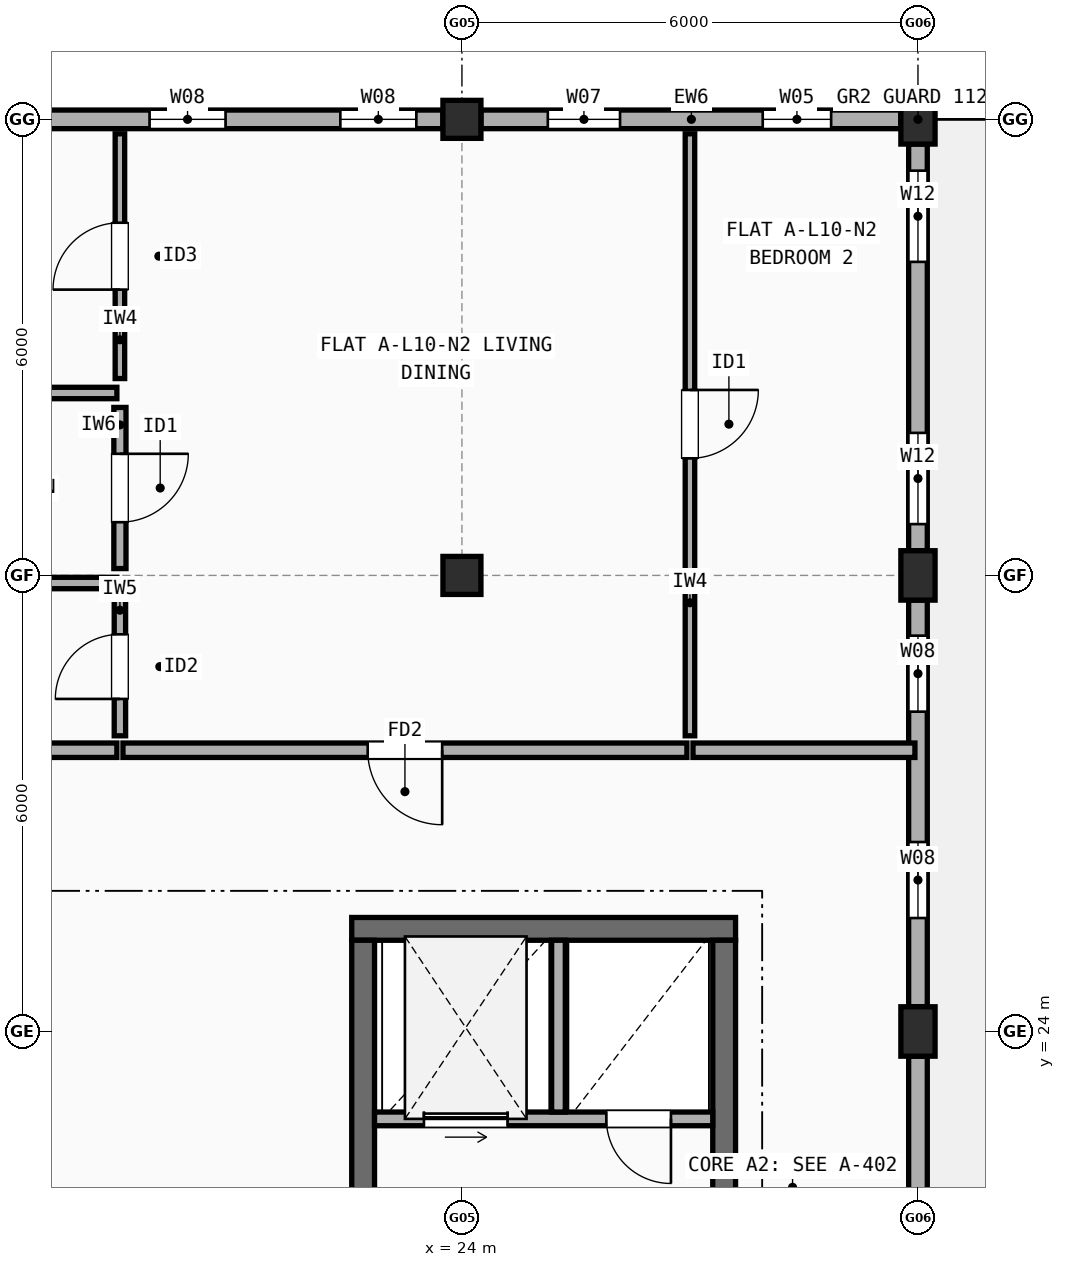
"""IFC4 building model, lengths in metres.
Left out: names, types, materials, properties, quantities, classifications, styles, units other than length and angle.
Written with IfcOpenShell. Run it as: python <this file> out.ifc"""

import sys

from ifc_helpers import new_model, si_unit, direction, frame, frame_2d, origin, origin_2d, place, context, subcontext, project, spatial, rectangle, extrude, element, fill, save


model = new_model("IFC4")
c1 = context("Model", 3, precision=1e-05, world=origin(), true_north=direction((0.0, 1.0)))
c2 = subcontext(c1, "Body", "Model", "MODEL_VIEW")
j1 = project(units=[si_unit("LENGTHUNIT", "METRE"), si_unit("PLANEANGLEUNIT", "RADIAN")], contexts=[c1])
p1 = place(None, origin())
s1 = spatial("IfcSite", under=j1, at=p1, CompositionType="ELEMENT")
p2 = place(p1, origin())
s2 = spatial("IfcBuilding", under=s1, at=p2, CompositionType="ELEMENT")
p3 = place(p2, frame((0.0, 0.0, 33.3)))
s3 = spatial("IfcBuildingStorey", under=s2, at=p3, CompositionType="ELEMENT", Elevation=33.3)
for number, where, z_axis, x_axis in (
    (1, (24.0, 30.0, 0.0), (0.0, 0.0, 1.0), (1.0, 0.0, 0.0)),
    (2, (24.0, 36.0, 0.0), (0.0, 0.0, 1.0), (1.0, 0.0, 0.0)),
):
    element("IfcColumn", number, at=place(p3, frame(where, z_axis=z_axis, x_axis=x_axis)), inside=s3, PredefinedType="COLUMN", context=c2, shape_type="SweptSolid", body=[
        extrude(rectangle(XDim=0.5, YDim=0.5, at=origin_2d()), origin(), (0.0, 0.0, 1.0), 2.99),
    ])
for number, where, z_axis, x_axis in (
    (3, (30.0, 24.0, 0.0), (0.0, 0.0, 1.0), (1.0, 0.0, 0.0)),
    (4, (30.0, 30.0, 0.0), (0.0, 0.0, 1.0), (1.0, 0.0, 0.0)),
    (5, (30.0, 36.0, 0.0), (0.0, 0.0, 1.0), (1.0, 0.0, 0.0)),
):
    element("IfcColumn", number, at=place(p3, frame(where, z_axis=z_axis, x_axis=x_axis)), inside=s3, PredefinedType="COLUMN", context=c2, shape_type="SweptSolid", body=[
        extrude(rectangle(XDim=0.45, YDim=0.65, at=origin_2d()), origin(), (0.0, 0.0, 1.0), 2.99),
    ])
p4 = place(p3, frame((30.0, 18.325, 0.0), z_axis=(0.0, 0.0, 1.0), x_axis=(0.0, 1.0, 0.0)))
e6 = element("IfcWall", 6, at=p4, inside=s3, PredefinedType="STANDARD", context=c2, shape_type="SweptSolid", body=[
    extrude(rectangle(XDim=5.35, YDim=0.245, at=frame_2d((2.675, 0.0))), origin(), (0.0, 0.0, 1.0), 2.472),
])
p5 = place(p4, frame((1.925, 0.0, 0.0)))
e7 = element("IfcOpeningElement", 7, at=p5, cuts=e6, PredefinedType="OPENING", context=c2, shape_type="SweptSolid", body=[
    extrude(rectangle(XDim=1.5, YDim=2.15, at=frame_2d((0.75, 1.075))), frame((0.0, 0.133, 0.0), z_axis=(0.0, -1.0, 0.0), x_axis=(1.0, 0.0, 0.0)), (0.0, 0.0, 1.0), 0.265),
])
p6 = place(p3, frame((30.0, 24.325, 0.0), z_axis=(0.0, 0.0, 1.0), x_axis=(0.0, 1.0, 0.0)))
e8 = element("IfcWall", 8, at=p6, inside=s3, PredefinedType="STANDARD", context=c2, shape_type="SweptSolid", body=[
    extrude(rectangle(XDim=5.35, YDim=0.245, at=frame_2d((2.675, 0.0))), origin(), (0.0, 0.0, 1.0), 2.472),
])
p7 = place(p6, frame((1.167, 0.0, 0.9)))
e9 = element("IfcOpeningElement", 9, at=p7, cuts=e8, PredefinedType="OPENING", context=c2, shape_type="SweptSolid", body=[
    extrude(rectangle(XDim=1.0, YDim=1.4, at=frame_2d((0.5, 0.7))), frame((0.0, 0.133, 0.0), z_axis=(0.0, -1.0, 0.0), x_axis=(1.0, 0.0, 0.0)), (0.0, 0.0, 1.0), 0.265),
])
p8 = place(p6, frame((3.883, 0.0, 0.9)))
e10 = element("IfcOpeningElement", 10, at=p8, cuts=e8, PredefinedType="OPENING", context=c2, shape_type="SweptSolid", body=[
    extrude(rectangle(XDim=1.0, YDim=1.4, at=frame_2d((0.5, 0.7))), frame((0.0, 0.133, 0.0), z_axis=(0.0, -1.0, 0.0), x_axis=(1.0, 0.0, 0.0)), (0.0, 0.0, 1.0), 0.265),
])
p9 = place(p3, frame((30.0, 30.325, 0.0), z_axis=(0.0, 0.0, 1.0), x_axis=(0.0, 1.0, 0.0)))
e11 = element("IfcWall", 11, at=p9, inside=s3, PredefinedType="STANDARD", context=c2, shape_type="SweptSolid", body=[
    extrude(rectangle(XDim=5.35, YDim=0.245, at=frame_2d((2.675, 0.0))), origin(), (0.0, 0.0, 1.0), 2.472),
])
p10 = place(p9, frame((0.35, 0.0, 0.9)))
e12 = element("IfcOpeningElement", 12, at=p10, cuts=e11, PredefinedType="OPENING", context=c2, shape_type="SweptSolid", body=[
    extrude(rectangle(XDim=1.2, YDim=1.35, at=frame_2d((0.6, 0.675))), frame((0.0, 0.133, 0.0), z_axis=(0.0, -1.0, 0.0), x_axis=(1.0, 0.0, 0.0)), (0.0, 0.0, 1.0), 0.265),
])
p11 = place(p9, frame((3.8, 0.0, 0.9)))
e13 = element("IfcOpeningElement", 13, at=p11, cuts=e11, PredefinedType="OPENING", context=c2, shape_type="SweptSolid", body=[
    extrude(rectangle(XDim=1.2, YDim=1.35, at=frame_2d((0.6, 0.675))), frame((0.0, 0.133, 0.0), z_axis=(0.0, -1.0, 0.0), x_axis=(1.0, 0.0, 0.0)), (0.0, 0.0, 1.0), 0.265),
])
p12 = place(p3, frame((29.775, 36.0, 0.0), z_axis=(0.0, 0.0, 1.0), x_axis=(-1.0, 0.0, 0.0)))
e14 = element("IfcWall", 14, at=p12, inside=s3, PredefinedType="STANDARD", context=c2, shape_type="SweptSolid", body=[
    extrude(rectangle(XDim=5.525, YDim=0.245, at=frame_2d((2.762, 0.0))), origin(), (0.0, 0.0, 1.0), 2.472),
])
p13 = place(p12, frame((0.917, 0.0, 0.9)))
e15 = element("IfcOpeningElement", 15, at=p13, cuts=e14, PredefinedType="OPENING", context=c2, shape_type="SweptSolid", body=[
    extrude(rectangle(XDim=0.9, YDim=1.4, at=frame_2d((0.45, 0.7))), frame((0.0, 0.133, 0.0), z_axis=(0.0, -1.0, 0.0), x_axis=(1.0, 0.0, 0.0)), (0.0, 0.0, 1.0), 0.265),
])
p14 = place(p12, frame((3.695, 0.0, 0.9)))
e16 = element("IfcOpeningElement", 16, at=p14, cuts=e14, PredefinedType="OPENING", context=c2, shape_type="SweptSolid", body=[
    extrude(rectangle(XDim=0.95, YDim=1.35, at=frame_2d((0.475, 0.675))), frame((0.0, 0.133, 0.0), z_axis=(0.0, -1.0, 0.0), x_axis=(1.0, 0.0, 0.0)), (0.0, 0.0, 1.0), 0.265),
])
p15 = place(p3, frame((23.75, 36.0, 0.0), z_axis=(0.0, 0.0, 1.0), x_axis=(-1.0, 0.0, 0.0)))
e17 = element("IfcWall", 17, at=p15, inside=s3, PredefinedType="STANDARD", context=c2, shape_type="SweptSolid", body=[
    extrude(rectangle(XDim=5.5, YDim=0.245, at=frame_2d((2.75, 0.0))), origin(), (0.0, 0.0, 1.0), 2.472),
])
p16 = place(p15, frame((0.35, 0.0, 0.9)))
e18 = element("IfcOpeningElement", 18, at=p16, cuts=e17, PredefinedType="OPENING", context=c2, shape_type="SweptSolid", body=[
    extrude(rectangle(XDim=1.0, YDim=1.4, at=frame_2d((0.5, 0.7))), frame((0.0, 0.133, 0.0), z_axis=(0.0, -1.0, 0.0), x_axis=(1.0, 0.0, 0.0)), (0.0, 0.0, 1.0), 0.265),
])
p17 = place(p15, frame((2.86, 0.0, 0.9)))
e19 = element("IfcOpeningElement", 19, at=p17, cuts=e17, PredefinedType="OPENING", context=c2, shape_type="SweptSolid", body=[
    extrude(rectangle(XDim=1.0, YDim=1.4, at=frame_2d((0.5, 0.7))), frame((0.0, 0.133, 0.0), z_axis=(0.0, -1.0, 0.0), x_axis=(1.0, 0.0, 0.0)), (0.0, 0.0, 1.0), 0.265),
])
p18 = place(p3, frame((27.6, 25.35, 0.0), z_axis=(0.0, 0.0, 1.0), x_axis=(-1.0, 0.0, 0.0)))
e20 = element("IfcWall", 20, at=p18, inside=s3, PredefinedType="SHEAR", context=c2, shape_type="SweptSolid", body=[
    extrude(rectangle(XDim=5.05, YDim=0.3, at=frame_2d((2.525, 0.0))), origin(), (0.0, 0.0, 1.0), 2.99),
])
p19 = place(p3, frame((27.45, 18.75, 0.0), z_axis=(0.0, 0.0, 1.0), x_axis=(0.0, 1.0, 0.0)))
e21 = element("IfcWall", 21, at=p19, inside=s3, PredefinedType="SHEAR", context=c2, shape_type="SweptSolid", body=[
    extrude(rectangle(XDim=6.45, YDim=0.3, at=frame_2d((3.225, 0.0))), origin(), (0.0, 0.0, 1.0), 2.99),
])
p20 = place(p3, frame((22.7, 21.75, 0.0), z_axis=(0.0, 0.0, 1.0), x_axis=(0.0, 1.0, 0.0)))
e22 = element("IfcWall", 22, at=p20, inside=s3, PredefinedType="SHEAR", context=c2, shape_type="SweptSolid", body=[
    extrude(rectangle(XDim=3.45, YDim=0.3, at=frame_2d((1.725, 0.0))), origin(), (0.0, 0.0, 1.0), 2.99),
])
p21 = place(p3, frame((22.85, 22.85, 0.0), z_axis=(0.0, 0.0, 1.0), x_axis=(1.0, 0.0, 0.0)))
e23 = element("IfcWall", 23, at=p21, inside=s3, PredefinedType="SOLIDWALL", context=c2, shape_type="SweptSolid", body=[
    extrude(rectangle(XDim=4.45, YDim=0.18, at=frame_2d((2.225, 0.0))), origin(), (0.0, 0.0, 1.0), 2.99),
])
p22 = place(p21, frame((0.65, 0.0, 0.0)))
e24 = element("IfcOpeningElement", 24, at=p22, cuts=e23, PredefinedType="OPENING", context=c2, shape_type="SweptSolid", body=[
    extrude(rectangle(XDim=1.1, YDim=2.15, at=frame_2d((0.55, 1.075))), frame((0.0, 0.1, 0.0), z_axis=(0.0, -1.0, 0.0), x_axis=(1.0, 0.0, 0.0)), (0.0, 0.0, 1.0), 0.2),
])
p23 = place(p21, frame((3.05, 0.0, 0.0)))
e25 = element("IfcOpeningElement", 25, at=p23, cuts=e23, PredefinedType="OPENING", context=c2, shape_type="SweptSolid", body=[
    extrude(rectangle(XDim=0.85, YDim=2.1, at=frame_2d((0.425, 1.05))), frame((0.0, 0.1, 0.0), z_axis=(0.0, -1.0, 0.0), x_axis=(1.0, 0.0, 0.0)), (0.0, 0.0, 1.0), 0.2),
])
p24 = place(p3, frame((25.27, 22.94, 0.0), z_axis=(0.0, 0.0, 1.0), x_axis=(0.0, 1.0, 0.0)))
e26 = element("IfcWall", 26, at=p24, inside=s3, PredefinedType="SOLIDWALL", context=c2, shape_type="SweptSolid", body=[
    extrude(rectangle(XDim=2.26, YDim=0.18, at=frame_2d((1.13, 0.0))), origin(), (0.0, 0.0, 1.0), 2.99),
])
p25 = place(p3, frame((15.04, 27.7, 0.0), z_axis=(0.0, 0.0, 1.0), x_axis=(1.0, 0.0, 0.0)))
e27 = element("IfcWall", 27, at=p25, inside=s3, PredefinedType="SOLIDWALL", context=c2, shape_type="SweptSolid", body=[
    extrude(rectangle(XDim=4.42, YDim=0.19, at=frame_2d((2.21, 0.0))), origin(), (0.0, 0.0, 1.0), 2.99),
])
p26 = place(p3, frame((19.54, 27.7, 0.0), z_axis=(0.0, 0.0, 1.0), x_axis=(1.0, 0.0, 0.0)))
e28 = element("IfcWall", 28, at=p26, inside=s3, PredefinedType="SOLIDWALL", context=c2, shape_type="SweptSolid", body=[
    extrude(rectangle(XDim=7.42, YDim=0.19, at=frame_2d((3.71, 0.0))), origin(), (0.0, 0.0, 1.0), 2.99),
])
p27 = place(p26, frame((3.22, 0.0, 0.0)))
e29 = element("IfcOpeningElement", 29, at=p27, cuts=e28, PredefinedType="OPENING", context=c2, shape_type="SweptSolid", body=[
    extrude(rectangle(XDim=0.98, YDim=2.15, at=frame_2d((0.49, 1.075))), frame((0.0, 0.105, 0.0), z_axis=(0.0, -1.0, 0.0), x_axis=(1.0, 0.0, 0.0)), (0.0, 0.0, 1.0), 0.21),
])
p28 = place(p3, frame((19.5, 32.59, 0.0), z_axis=(0.0, 0.0, 1.0), x_axis=(0.0, 1.0, 0.0)))
e30 = element("IfcWall", 30, at=p28, inside=s3, PredefinedType="PARTITIONING", context=c2, shape_type="SweptSolid", body=[
    extrude(rectangle(XDim=3.22, YDim=0.125, at=frame_2d((1.61, 0.0))), origin(), (0.0, 0.0, 1.0), 2.99),
])
p29 = place(p28, frame((1.17, 0.0, 0.0)))
e31 = element("IfcOpeningElement", 31, at=p29, cuts=e30, PredefinedType="OPENING", context=c2, shape_type="SweptSolid", body=[
    extrude(rectangle(XDim=0.88, YDim=2.1, at=frame_2d((0.44, 1.05))), frame((0.0, 0.073, 0.0), z_axis=(0.0, -1.0, 0.0), x_axis=(1.0, 0.0, 0.0)), (0.0, 0.0, 1.0), 0.145),
])
p30 = place(p3, frame((19.5, 30.09, 0.0), z_axis=(0.0, 0.0, 1.0), x_axis=(0.0, 1.0, 0.0)))
e32 = element("IfcWall", 32, at=p30, inside=s3, PredefinedType="PLUMBINGWALL", context=c2, shape_type="SweptSolid", body=[
    extrude(rectangle(XDim=2.12, YDim=0.16, at=frame_2d((1.06, 0.0))), origin(), (0.0, 0.0, 1.0), 2.472),
])
p31 = place(p30, frame((0.61, 0.0, 0.0)))
e33 = element("IfcOpeningElement", 33, at=p31, cuts=e32, PredefinedType="OPENING", context=c2, shape_type="SweptSolid", body=[
    extrude(rectangle(XDim=0.9, YDim=2.1, at=frame_2d((0.45, 1.05))), frame((0.0, 0.09, 0.0), z_axis=(0.0, -1.0, 0.0), x_axis=(1.0, 0.0, 0.0)), (0.0, 0.0, 1.0), 0.18),
])
p32 = place(p3, frame((19.5, 27.89, 0.0), z_axis=(0.0, 0.0, 1.0), x_axis=(0.0, 1.0, 0.0)))
e34 = element("IfcWall", 34, at=p32, inside=s3, PredefinedType="PARTITIONING", context=c2, shape_type="SweptSolid", body=[
    extrude(rectangle(XDim=1.82, YDim=0.15, at=frame_2d((0.91, 0.0))), origin(), (0.0, 0.0, 1.0), 2.99),
])
p33 = place(p32, frame((0.485, 0.0, 0.0)))
e35 = element("IfcOpeningElement", 35, at=p33, cuts=e34, PredefinedType="OPENING", context=c2, shape_type="SweptSolid", body=[
    extrude(rectangle(XDim=0.85, YDim=2.1, at=frame_2d((0.425, 1.05))), frame((0.0, 0.085, 0.0), z_axis=(0.0, -1.0, 0.0), x_axis=(1.0, 0.0, 0.0)), (0.0, 0.0, 1.0), 0.17),
])
p34 = place(p3, frame((15.04, 32.4, 0.0), z_axis=(0.0, 0.0, 1.0), x_axis=(1.0, 0.0, 0.0)))
e36 = element("IfcWall", 36, at=p34, inside=s3, PredefinedType="PARTITIONING", context=c2, shape_type="SweptSolid", body=[
    extrude(rectangle(XDim=4.42, YDim=0.15, at=frame_2d((2.21, 0.0))), origin(), (0.0, 0.0, 1.0), 2.458),
])
p35 = place(p3, frame((15.04, 29.9, 0.0), z_axis=(0.0, 0.0, 1.0), x_axis=(1.0, 0.0, 0.0)))
e37 = element("IfcWall", 37, at=p35, inside=s3, PredefinedType="PARTITIONING", context=c2, shape_type="SweptSolid", body=[
    extrude(rectangle(XDim=4.42, YDim=0.15, at=frame_2d((2.21, 0.0))), origin(), (0.0, 0.0, 1.0), 2.472),
])
p36 = place(p3, frame((27.04, 27.7, 0.0), z_axis=(0.0, 0.0, 1.0), x_axis=(1.0, 0.0, 0.0)))
e38 = element("IfcWall", 38, at=p36, inside=s3, PredefinedType="SOLIDWALL", context=c2, shape_type="SweptSolid", body=[
    extrude(rectangle(XDim=2.92, YDim=0.19, at=frame_2d((1.46, 0.0))), origin(), (0.0, 0.0, 1.0), 2.472),
])
p37 = place(p3, frame((27.0, 27.89, 0.0), z_axis=(0.0, 0.0, 1.0), x_axis=(0.0, 1.0, 0.0)))
e39 = element("IfcWall", 39, at=p37, inside=s3, PredefinedType="PARTITIONING", context=c2, shape_type="SweptSolid", body=[
    extrude(rectangle(XDim=7.92, YDim=0.125, at=frame_2d((3.96, 0.0))), origin(), (0.0, 0.0, 1.0), 2.472),
])
p38 = place(p37, frame((3.65, 0.0, 0.0)))
e40 = element("IfcOpeningElement", 40, at=p38, cuts=e39, PredefinedType="OPENING", context=c2, shape_type="SweptSolid", body=[
    extrude(rectangle(XDim=0.9, YDim=2.1, at=frame_2d((0.45, 1.05))), frame((0.0, 0.073, 0.0), z_axis=(0.0, -1.0, 0.0), x_axis=(1.0, 0.0, 0.0)), (0.0, 0.0, 1.0), 0.145),
])
p39 = place(p7, origin())
e41 = element("IfcWindow", 41, at=p39, inside=s3, PartitioningType="SINGLE_PANEL", PredefinedType="WINDOW", context=c2, shape_type="SweptSolid", body=[
    extrude(rectangle(XDim=1.0, YDim=1.4, at=frame_2d((0.5, 0.7))), frame((0.0, 0.03, 0.0), z_axis=(0.0, -1.0, 0.0), x_axis=(1.0, 0.0, 0.0)), (0.0, 0.0, 1.0), 0.06),
])
fill(e9, e41)
p40 = place(p8, origin())
e42 = element("IfcWindow", 42, at=p40, inside=s3, PartitioningType="SINGLE_PANEL", PredefinedType="WINDOW", context=c2, shape_type="SweptSolid", body=[
    extrude(rectangle(XDim=1.0, YDim=1.4, at=frame_2d((0.5, 0.7))), frame((0.0, 0.03, 0.0), z_axis=(0.0, -1.0, 0.0), x_axis=(1.0, 0.0, 0.0)), (0.0, 0.0, 1.0), 0.06),
])
fill(e10, e42)
p41 = place(p10, origin())
e43 = element("IfcWindow", 43, at=p41, inside=s3, PartitioningType="SINGLE_PANEL", PredefinedType="WINDOW", context=c2, shape_type="SweptSolid", body=[
    extrude(rectangle(XDim=1.2, YDim=1.35, at=frame_2d((0.6, 0.675))), frame((0.0, 0.03, 0.0), z_axis=(0.0, -1.0, 0.0), x_axis=(1.0, 0.0, 0.0)), (0.0, 0.0, 1.0), 0.06),
])
fill(e12, e43)
p42 = place(p11, origin())
e44 = element("IfcWindow", 44, at=p42, inside=s3, PartitioningType="SINGLE_PANEL", PredefinedType="WINDOW", context=c2, shape_type="SweptSolid", body=[
    extrude(rectangle(XDim=1.2, YDim=1.35, at=frame_2d((0.6, 0.675))), frame((0.0, 0.03, 0.0), z_axis=(0.0, -1.0, 0.0), x_axis=(1.0, 0.0, 0.0)), (0.0, 0.0, 1.0), 0.06),
])
fill(e13, e44)
p43 = place(p13, origin())
e45 = element("IfcWindow", 45, at=p43, inside=s3, PartitioningType="SINGLE_PANEL", PredefinedType="WINDOW", context=c2, shape_type="SweptSolid", body=[
    extrude(rectangle(XDim=0.9, YDim=1.4, at=frame_2d((0.45, 0.7))), frame((0.0, 0.03, 0.0), z_axis=(0.0, -1.0, 0.0), x_axis=(1.0, 0.0, 0.0)), (0.0, 0.0, 1.0), 0.06),
])
fill(e15, e45)
p44 = place(p14, origin())
e46 = element("IfcWindow", 46, at=p44, inside=s3, PartitioningType="SINGLE_PANEL", PredefinedType="WINDOW", context=c2, shape_type="SweptSolid", body=[
    extrude(rectangle(XDim=0.95, YDim=1.35, at=frame_2d((0.475, 0.675))), frame((0.0, 0.03, 0.0), z_axis=(0.0, -1.0, 0.0), x_axis=(1.0, 0.0, 0.0)), (0.0, 0.0, 1.0), 0.06),
])
fill(e16, e46)
p45 = place(p16, origin())
e47 = element("IfcWindow", 47, at=p45, inside=s3, PartitioningType="SINGLE_PANEL", PredefinedType="WINDOW", context=c2, shape_type="SweptSolid", body=[
    extrude(rectangle(XDim=1.0, YDim=1.4, at=frame_2d((0.5, 0.7))), frame((0.0, 0.03, 0.0), z_axis=(0.0, -1.0, 0.0), x_axis=(1.0, 0.0, 0.0)), (0.0, 0.0, 1.0), 0.06),
])
fill(e18, e47)
p46 = place(p17, origin())
e48 = element("IfcWindow", 48, at=p46, inside=s3, PartitioningType="SINGLE_PANEL", PredefinedType="WINDOW", context=c2, shape_type="SweptSolid", body=[
    extrude(rectangle(XDim=1.0, YDim=1.4, at=frame_2d((0.5, 0.7))), frame((0.0, 0.03, 0.0), z_axis=(0.0, -1.0, 0.0), x_axis=(1.0, 0.0, 0.0)), (0.0, 0.0, 1.0), 0.06),
])
fill(e19, e48)
p47 = place(p22, origin())
e49 = element("IfcDoor", 49, at=p47, inside=s3, OperationType="SLIDING_TO_LEFT", PredefinedType="DOOR", context=c2, shape_type="SweptSolid", body=[
    extrude(rectangle(XDim=1.1, YDim=2.15, at=frame_2d((0.55, 1.075))), frame((0.0, 0.025, 0.0), z_axis=(0.0, -1.0, 0.0), x_axis=(1.0, 0.0, 0.0)), (0.0, 0.0, 1.0), 0.05),
])
fill(e24, e49)
p48 = place(p23, frame((0.85, 0.0, 0.0), z_axis=(0.0, 0.0, 1.0), x_axis=(-1.0, 0.0, 0.0)))
e50 = element("IfcDoor", 50, at=p48, inside=s3, OperationType="SINGLE_SWING_RIGHT", PredefinedType="DOOR", context=c2, shape_type="SweptSolid", body=[
    extrude(rectangle(XDim=0.85, YDim=2.1, at=frame_2d((0.425, 1.05))), frame((0.0, 0.025, 0.0), z_axis=(0.0, -1.0, 0.0), x_axis=(1.0, 0.0, 0.0)), (0.0, 0.0, 1.0), 0.05),
])
fill(e25, e50)
p49 = place(p27, origin())
e51 = element("IfcDoor", 51, at=p49, inside=s3, OperationType="SINGLE_SWING_RIGHT", PredefinedType="DOOR", context=c2, shape_type="SweptSolid", body=[
    extrude(rectangle(XDim=0.98, YDim=2.15, at=frame_2d((0.49, 1.075))), frame((0.0, 0.025, 0.0), z_axis=(0.0, -1.0, 0.0), x_axis=(1.0, 0.0, 0.0)), (0.0, 0.0, 1.0), 0.05),
])
fill(e29, e51)
p50 = place(p29, origin())
e52 = element("IfcDoor", 52, at=p50, inside=s3, OperationType="SINGLE_SWING_LEFT", PredefinedType="DOOR", context=c2, shape_type="SweptSolid", body=[
    extrude(rectangle(XDim=0.88, YDim=2.1, at=frame_2d((0.44, 1.05))), frame((0.0, 0.025, 0.0), z_axis=(0.0, -1.0, 0.0), x_axis=(1.0, 0.0, 0.0)), (0.0, 0.0, 1.0), 0.05),
])
fill(e31, e52)
p51 = place(p31, origin())
e53 = element("IfcDoor", 53, at=p51, inside=s3, OperationType="SINGLE_SWING_RIGHT", PredefinedType="DOOR", context=c2, shape_type="SweptSolid", body=[
    extrude(rectangle(XDim=0.9, YDim=2.1, at=frame_2d((0.45, 1.05))), frame((0.0, 0.025, 0.0), z_axis=(0.0, -1.0, 0.0), x_axis=(1.0, 0.0, 0.0)), (0.0, 0.0, 1.0), 0.05),
])
fill(e33, e53)
p52 = place(p33, origin())
e54 = element("IfcDoor", 54, at=p52, inside=s3, OperationType="SINGLE_SWING_LEFT", PredefinedType="DOOR", context=c2, shape_type="SweptSolid", body=[
    extrude(rectangle(XDim=0.85, YDim=2.1, at=frame_2d((0.425, 1.05))), frame((0.0, 0.025, 0.0), z_axis=(0.0, -1.0, 0.0), x_axis=(1.0, 0.0, 0.0)), (0.0, 0.0, 1.0), 0.05),
])
fill(e35, e54)
p53 = place(p38, origin())
e55 = element("IfcDoor", 55, at=p53, inside=s3, OperationType="SINGLE_SWING_RIGHT", PredefinedType="DOOR", context=c2, shape_type="SweptSolid", body=[
    extrude(rectangle(XDim=0.9, YDim=2.1, at=frame_2d((0.45, 1.05))), frame((0.0, 0.025, 0.0), z_axis=(0.0, -1.0, 0.0), x_axis=(1.0, 0.0, 0.0)), (0.0, 0.0, 1.0), 0.05),
])
fill(e40, e55)
save(model, sys.argv[1])
